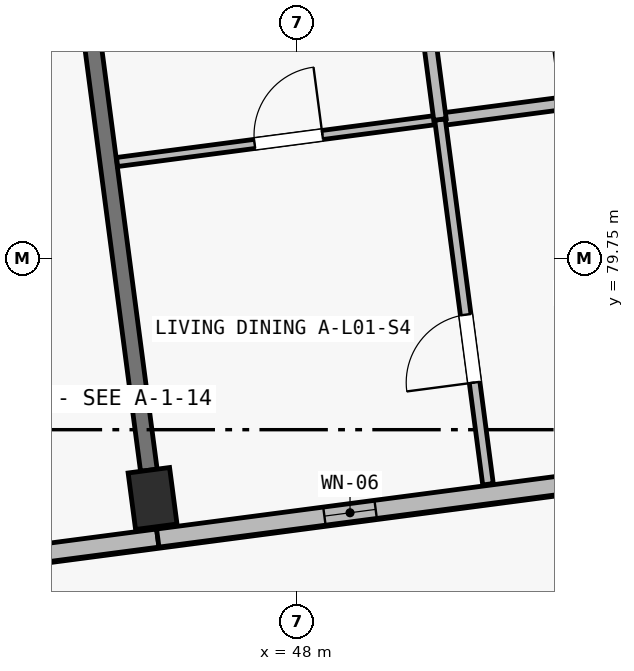
"""IFC4 building model, lengths in metres.
Left out: names, types, materials, properties, quantities, classifications, styles, units other than length and angle.
Written with IfcOpenShell. Run it as: python <this file> out.ifc"""

import sys

from ifc_helpers import new_model, si_unit, direction, frame, frame_2d, origin, origin_2d, place, context, subcontext, project, spatial, rectangle, extrude, element, fill, save


model = new_model("IFC4")
c1 = context("Model", 3, precision=1e-05, world=origin(), true_north=direction((0.0, 1.0)))
c2 = subcontext(c1, "Body", "Model", "MODEL_VIEW")
j1 = project(units=[si_unit("LENGTHUNIT", "METRE"), si_unit("PLANEANGLEUNIT", "RADIAN")], contexts=[c1])
p1 = place(None, origin())
s1 = spatial("IfcSite", under=j1, at=p1, CompositionType="ELEMENT")
p2 = place(p1, origin())
s2 = spatial("IfcBuilding", under=s1, at=p2, CompositionType="ELEMENT")
p3 = place(p2, frame((0.0, 0.0, 4.5)))
s3 = spatial("IfcBuildingStorey", under=s2, at=p3, CompositionType="ELEMENT", Elevation=4.5)
p4 = place(p3, frame((46.099, 76.594, 0.0), z_axis=(0.0, 0.0, 1.0), x_axis=(0.991444861374, 0.13052619222, 0.0)))
e1 = element("IfcColumn", 1, at=p4, inside=s3, PredefinedType="COLUMN", context=c2, shape_type="SweptSolid", body=[
    extrude(rectangle(XDim=0.55, YDim=0.75, at=origin_2d()), origin(), (0.0, 0.0, 1.0), 3.9),
])
p5 = place(p3, frame((46.05, 76.966, -0.25), z_axis=(0.0, 0.0, 1.0), x_axis=(-0.130519009654, 0.99144580695, 0.0)))
e2 = element("IfcWall", 2, at=p5, inside=s3, PredefinedType="SHEAR", context=c2, shape_type="SweptSolid", body=[
    extrude(rectangle(XDim=7.05, YDim=0.22, at=frame_2d((3.525, 0.0))), origin(), (0.0, 0.0, 1.0), 3.4),
])
p6 = place(p3, frame((46.167, 76.074, 0.0), z_axis=(0.0, 0.0, 1.0), x_axis=(-0.991444377792, -0.130529865336, 0.0)))
e3 = element("IfcWall", 3, at=p6, inside=s3, PredefinedType="SOLIDWALL", context=c2, shape_type="SweptSolid", body=[
    extrude(rectangle(XDim=8.8, YDim=0.24, at=frame_2d((4.4, 0.0))), origin(), (0.0, 0.0, 1.0), 3.65),
])
p7 = place(p6, frame((3.6, 0.0, 0.0)))
e4 = element("IfcOpeningElement", 4, at=p7, cuts=e3, PredefinedType="OPENING", context=c2, shape_type="SweptSolid", body=[
    extrude(rectangle(XDim=1.6, YDim=2.15, at=frame_2d((0.8, 1.075))), frame((0.0, 0.135, 0.0), z_axis=(0.0, -1.0, 0.0), x_axis=(1.0, 0.0, 0.0)), (0.0, 0.0, 1.0), 0.27),
])
p8 = place(p3, frame((54.892, 77.223, 0.0), z_axis=(0.0, 0.0, 1.0), x_axis=(-0.991443905089, -0.130533455715, 0.0)))
e5 = element("IfcWall", 5, at=p8, inside=s3, PredefinedType="SOLIDWALL", context=c2, shape_type="SweptSolid", body=[
    extrude(rectangle(XDim=8.8, YDim=0.24, at=frame_2d((4.4, 0.0))), origin(), (0.0, 0.0, 1.0), 3.65),
])
p9 = place(p8, frame((2.26, 0.0, 0.52)))
e6 = element("IfcOpeningElement", 6, at=p9, cuts=e5, PredefinedType="OPENING", context=c2, shape_type="SweptSolid", body=[
    extrude(rectangle(XDim=0.62, YDim=2.28, at=frame_2d((0.31, 1.14))), frame((0.0, 0.135, 0.0), z_axis=(0.0, -1.0, 0.0), x_axis=(1.0, 0.0, 0.0)), (0.0, 0.0, 1.0), 0.27),
])
p10 = place(p8, frame((5.909, 0.0, 0.52)))
e7 = element("IfcOpeningElement", 7, at=p10, cuts=e5, PredefinedType="OPENING", context=c2, shape_type="SweptSolid", body=[
    extrude(rectangle(XDim=0.68, YDim=2.24, at=frame_2d((0.34, 1.12))), frame((0.0, 0.135, 0.0), z_axis=(0.0, -1.0, 0.0), x_axis=(1.0, 0.0, 0.0)), (0.0, 0.0, 1.0), 0.27),
])
p11 = place(p3, frame((45.632, 81.021, 0.0), z_axis=(0.0, 0.0, 1.0), x_axis=(0.991444014242, 0.130532626667, 0.0)))
e8 = element("IfcWall", 8, at=p11, inside=s3, PredefinedType="PARTITIONING", context=c2, shape_type="SweptSolid", body=[
    extrude(rectangle(XDim=4.285, YDim=0.12, at=frame_2d((2.143, 0.0))), origin(), (0.0, 0.0, 1.0), 3.62),
])
p12 = place(p11, frame((1.825, 0.0, 0.0)))
e9 = element("IfcOpeningElement", 9, at=p12, cuts=e8, PredefinedType="OPENING", context=c2, shape_type="SweptSolid", body=[
    extrude(rectangle(XDim=0.9, YDim=2.1, at=frame_2d((0.45, 1.05))), frame((0.0, 0.075, 0.0), z_axis=(0.0, -1.0, 0.0), x_axis=(1.0, 0.0, 0.0)), (0.0, 0.0, 1.0), 0.15),
])
p13 = place(p3, frame((49.88, 81.581, 0.0), z_axis=(0.0, 0.0, 1.0), x_axis=(0.991444014242, 0.130532626667, 0.0)))
e10 = element("IfcWall", 10, at=p13, inside=s3, PredefinedType="PLUMBINGWALL", context=c2, shape_type="SweptSolid", body=[
    extrude(rectangle(XDim=4.285, YDim=0.165, at=frame_2d((2.143, 0.0))), origin(), (0.0, 0.0, 1.0), 3.62),
])
p14 = place(p13, frame((1.6, 0.0, 0.0)))
e11 = element("IfcOpeningElement", 11, at=p14, cuts=e10, PredefinedType="OPENING", context=c2, shape_type="SweptSolid", body=[
    extrude(rectangle(XDim=0.82, YDim=2.08, at=frame_2d((0.41, 1.04))), frame((0.0, 0.097, 0.0), z_axis=(0.0, -1.0, 0.0), x_axis=(1.0, 0.0, 0.0)), (0.0, 0.0, 1.0), 0.195),
])
p15 = place(p3, frame((50.512, 76.782, 0.0), z_axis=(0.0, 0.0, 1.0), x_axis=(-0.130544545786, 0.991442444908, 0.0)))
e12 = element("IfcWall", 12, at=p15, inside=s3, PredefinedType="PARTITIONING", context=c2, shape_type="SweptSolid", body=[
    extrude(rectangle(XDim=4.84, YDim=0.14, at=frame_2d((2.42, 0.0))), origin(), (0.0, 0.0, 1.0), 3.62),
])
p16 = place(p15, frame((1.35, 0.0, 0.0)))
e13 = element("IfcOpeningElement", 13, at=p16, cuts=e12, PredefinedType="OPENING", context=c2, shape_type="SweptSolid", body=[
    extrude(rectangle(XDim=0.9, YDim=2.1, at=frame_2d((0.45, 1.05))), frame((0.0, 0.085, 0.0), z_axis=(0.0, -1.0, 0.0), x_axis=(1.0, 0.0, 0.0)), (0.0, 0.0, 1.0), 0.17),
])
p17 = place(p3, frame((49.88, 81.581, 0.0), z_axis=(0.0, 0.0, 1.0), x_axis=(-0.130551670646, 0.991441506742, 0.0)))
e14 = element("IfcWall", 14, at=p17, inside=s3, PredefinedType="PLUMBINGWALL", context=c2, shape_type="SweptSolid", body=[
    extrude(rectangle(XDim=3.77, YDim=0.165, at=frame_2d((1.885, 0.0))), origin(), (0.0, 0.0, 1.0), 3.62),
])
p18 = place(p10, origin())
e15 = element("IfcWindow", 15, at=p18, inside=s3, PartitioningType="SINGLE_PANEL", PredefinedType="WINDOW", context=c2, shape_type="SweptSolid", body=[
    extrude(rectangle(XDim=0.68, YDim=2.24, at=frame_2d((0.34, 1.12))), frame((0.0, 0.03, 0.0), z_axis=(0.0, -1.0, 0.0), x_axis=(1.0, 0.0, 0.0)), (0.0, 0.0, 1.0), 0.06),
])
fill(e7, e15)
p19 = place(p12, origin())
e16 = element("IfcDoor", 16, at=p19, inside=s3, OperationType="SINGLE_SWING_RIGHT", PredefinedType="DOOR", context=c2, shape_type="SweptSolid", body=[
    extrude(rectangle(XDim=0.9, YDim=2.1, at=frame_2d((0.45, 1.05))), frame((0.0, 0.025, 0.0), z_axis=(0.0, -1.0, 0.0), x_axis=(1.0, 0.0, 0.0)), (0.0, 0.0, 1.0), 0.05),
])
fill(e9, e16)
p20 = place(p16, origin())
e17 = element("IfcDoor", 17, at=p20, inside=s3, OperationType="SINGLE_SWING_LEFT", PredefinedType="DOOR", context=c2, shape_type="SweptSolid", body=[
    extrude(rectangle(XDim=0.9, YDim=2.1, at=frame_2d((0.45, 1.05))), frame((0.0, 0.025, 0.0), z_axis=(0.0, -1.0, 0.0), x_axis=(1.0, 0.0, 0.0)), (0.0, 0.0, 1.0), 0.05),
])
fill(e13, e17)
save(model, sys.argv[1])
